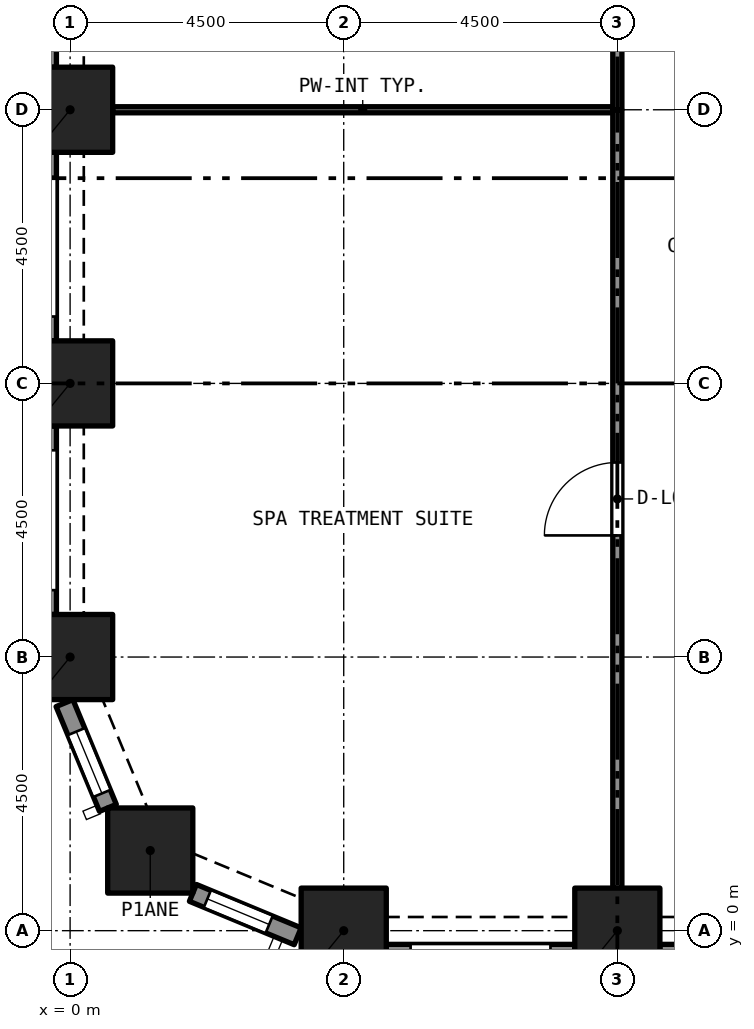
"""IFC4 building model, lengths in metres.
Left out: names, types, materials, properties, quantities, classifications, styles, units other than length and angle.
Written with IfcOpenShell. Run it as: python <this file> out.ifc"""

import sys

from ifc_helpers import new_model, si_unit, direction, frame, frame_2d, origin, origin_2d, place, context, subcontext, project, spatial, rectangle, extrude, element, fill, save


model = new_model("IFC4")
c1 = context("Model", 3, precision=1e-05, world=origin(), true_north=direction((0.0, 1.0)))
c2 = subcontext(c1, "Body", "Model", "MODEL_VIEW")
j1 = project(units=[si_unit("LENGTHUNIT", "METRE"), si_unit("PLANEANGLEUNIT", "RADIAN")], contexts=[c1])
p1 = place(None, origin())
s1 = spatial("IfcSite", under=j1, at=p1, CompositionType="ELEMENT")
p2 = place(p1, origin())
s2 = spatial("IfcBuilding", under=s1, at=p2, CompositionType="ELEMENT")
p3 = place(p2, frame((0.0, 0.0, 16.0)))
s3 = spatial("IfcBuildingStorey", under=s2, at=p3, CompositionType="ELEMENT", Elevation=16.0)
for number, where, z_axis, x_axis in (
    (1, (4.5, 0.0, 0.0), (0.0, 0.0, 1.0), (1.0, 0.0, 0.0)),
    (2, (9.0, 0.0, 0.0), (0.0, 0.0, 1.0), (1.0, 0.0, 0.0)),
    (3, (1.318, 1.318, 0.0), (0.0, 0.0, 1.0), (1.0, 0.0, 0.0)),
    (4, (0.0, 4.5, 0.0), (0.0, 0.0, 1.0), (1.0, 0.0, 0.0)),
    (5, (0.0, 9.0, 0.0), (0.0, 0.0, 1.0), (1.0, 0.0, 0.0)),
    (6, (0.0, 13.5, 0.0), (0.0, 0.0, 1.0), (1.0, 0.0, 0.0)),
):
    element("IfcColumn", number, at=place(p3, frame(where, z_axis=z_axis, x_axis=x_axis)), inside=s3, PredefinedType="COLUMN", context=c2, shape_type="SweptSolid", body=[
        extrude(rectangle(XDim=1.4, YDim=1.4, at=origin_2d()), origin(), (0.0, 0.0, 1.0), 5.0),
    ])
p4 = place(p3, frame((-0.375, 14.2, 0.0), z_axis=(0.0, 0.0, 1.0), x_axis=(0.0, 1.0, 0.0)))
e7 = element("IfcWall", 7, at=p4, inside=s3, PredefinedType="SOLIDWALL", context=c2, shape_type="SweptSolid", body=[
    extrude(rectangle(XDim=3.1, YDim=0.3, at=frame_2d((1.55, 0.0))), origin(), (0.0, 0.0, 1.0), 5.0),
])
p5 = place(p4, frame((0.4, 0.0, 0.45)))
e8 = element("IfcOpeningElement", 8, at=p5, cuts=e7, PredefinedType="OPENING", context=c2, shape_type="SweptSolid", body=[
    extrude(rectangle(XDim=2.3, YDim=3.3, at=frame_2d((1.15, 1.65))), frame((0.0, 0.16, 0.0), z_axis=(0.0, -1.0, 0.0), x_axis=(1.0, 0.0, 0.0)), (0.0, 0.0, 1.0), 0.32),
])
p6 = place(p3, frame((-0.375, 9.7, 0.0), z_axis=(0.0, 0.0, 1.0), x_axis=(0.0, 1.0, 0.0)))
e9 = element("IfcWall", 9, at=p6, inside=s3, PredefinedType="SOLIDWALL", context=c2, shape_type="SweptSolid", body=[
    extrude(rectangle(XDim=3.1, YDim=0.3, at=frame_2d((1.55, 0.0))), origin(), (0.0, 0.0, 1.0), 5.0),
])
p7 = place(p6, frame((0.4, 0.0, 0.45)))
e10 = element("IfcOpeningElement", 10, at=p7, cuts=e9, PredefinedType="OPENING", context=c2, shape_type="SweptSolid", body=[
    extrude(rectangle(XDim=2.3, YDim=3.3, at=frame_2d((1.15, 1.65))), frame((0.0, 0.16, 0.0), z_axis=(0.0, -1.0, 0.0), x_axis=(1.0, 0.0, 0.0)), (0.0, 0.0, 1.0), 0.32),
])
p8 = place(p3, frame((-0.375, 5.2, 0.0), z_axis=(0.0, 0.0, 1.0), x_axis=(0.0, 1.0, 0.0)))
e11 = element("IfcWall", 11, at=p8, inside=s3, PredefinedType="SOLIDWALL", context=c2, shape_type="SweptSolid", body=[
    extrude(rectangle(XDim=3.1, YDim=0.3, at=frame_2d((1.55, 0.0))), origin(), (0.0, 0.0, 1.0), 5.0),
])
p9 = place(p8, frame((0.4, 0.0, 0.45)))
e12 = element("IfcOpeningElement", 12, at=p9, cuts=e11, PredefinedType="OPENING", context=c2, shape_type="SweptSolid", body=[
    extrude(rectangle(XDim=2.3, YDim=3.3, at=frame_2d((1.15, 1.65))), frame((0.0, 0.16, 0.0), z_axis=(0.0, -1.0, 0.0), x_axis=(1.0, 0.0, 0.0)), (0.0, 0.0, 1.0), 0.32),
])
p10 = place(p3, frame((0.622, 2.02, 0.0), z_axis=(0.0, 0.0, 1.0), x_axis=(-0.38262540684, 0.923903565336, 0.0)))
e13 = element("IfcWall", 13, at=p10, inside=s3, PredefinedType="SOLIDWALL", context=c2, shape_type="SweptSolid", body=[
    extrude(rectangle(XDim=1.865, YDim=0.3, at=frame_2d((0.933, 0.0))), origin(), (0.0, 0.0, 1.0), 5.0),
])
p11 = place(p10, frame((0.258, 0.0, 0.45)))
e14 = element("IfcOpeningElement", 14, at=p11, cuts=e13, PredefinedType="OPENING", context=c2, shape_type="SweptSolid", body=[
    extrude(rectangle(XDim=1.1, YDim=3.3, at=frame_2d((0.55, 1.65))), frame((0.0, 0.16, 0.0), z_axis=(0.0, -1.0, 0.0), x_axis=(1.0, 0.0, 0.0)), (0.0, 0.0, 1.0), 0.32),
])
p12 = place(p3, frame((3.743, -0.092, 0.0), z_axis=(0.0, 0.0, 1.0), x_axis=(-0.923857286003, 0.382737135771, 0.0)))
e15 = element("IfcWall", 15, at=p12, inside=s3, PredefinedType="SOLIDWALL", context=c2, shape_type="SweptSolid", body=[
    extrude(rectangle(XDim=1.865, YDim=0.3, at=frame_2d((0.933, 0.0))), origin(), (0.0, 0.0, 1.0), 5.0),
])
p13 = place(p12, frame((0.508, 0.0, 0.45)))
e16 = element("IfcOpeningElement", 16, at=p13, cuts=e15, PredefinedType="OPENING", context=c2, shape_type="SweptSolid", body=[
    extrude(rectangle(XDim=1.1, YDim=3.3, at=frame_2d((0.55, 1.65))), frame((0.0, 0.16, 0.0), z_axis=(0.0, -1.0, 0.0), x_axis=(1.0, 0.0, 0.0)), (0.0, 0.0, 1.0), 0.32),
])
p14 = place(p3, frame((8.3, -0.375, 0.0), z_axis=(0.0, 0.0, 1.0), x_axis=(-1.0, 0.0, 0.0)))
e17 = element("IfcWall", 17, at=p14, inside=s3, PredefinedType="SOLIDWALL", context=c2, shape_type="SweptSolid", body=[
    extrude(rectangle(XDim=3.1, YDim=0.3, at=frame_2d((1.55, 0.0))), origin(), (0.0, 0.0, 1.0), 5.0),
])
p15 = place(p14, frame((0.4, 0.0, 0.45)))
e18 = element("IfcOpeningElement", 18, at=p15, cuts=e17, PredefinedType="OPENING", context=c2, shape_type="SweptSolid", body=[
    extrude(rectangle(XDim=2.3, YDim=3.3, at=frame_2d((1.15, 1.65))), frame((0.0, 0.16, 0.0), z_axis=(0.0, -1.0, 0.0), x_axis=(1.0, 0.0, 0.0)), (0.0, 0.0, 1.0), 0.32),
])
p16 = place(p3, frame((12.8, -0.375, 0.0), z_axis=(0.0, 0.0, 1.0), x_axis=(-1.0, 0.0, 0.0)))
e19 = element("IfcWall", 19, at=p16, inside=s3, PredefinedType="SOLIDWALL", context=c2, shape_type="SweptSolid", body=[
    extrude(rectangle(XDim=3.1, YDim=0.3, at=frame_2d((1.55, 0.0))), origin(), (0.0, 0.0, 1.0), 5.0),
])
p17 = place(p16, frame((0.4, 0.0, 0.45)))
e20 = element("IfcOpeningElement", 20, at=p17, cuts=e19, PredefinedType="OPENING", context=c2, shape_type="SweptSolid", body=[
    extrude(rectangle(XDim=2.3, YDim=3.3, at=frame_2d((1.15, 1.65))), frame((0.0, 0.16, 0.0), z_axis=(0.0, -1.0, 0.0), x_axis=(1.0, 0.0, 0.0)), (0.0, 0.0, 1.0), 0.32),
])
p18 = place(p3, frame((0.7, 13.5, 0.0), z_axis=(0.0, 0.0, 1.0), x_axis=(1.0, 0.0, 0.0)))
e21 = element("IfcWall", 21, at=p18, inside=s3, PredefinedType="PARTITIONING", context=c2, shape_type="SweptSolid", body=[
    extrude(rectangle(XDim=8.225, YDim=0.1, at=frame_2d((4.113, 0.0))), origin(), (0.0, 0.0, 1.0), 4.65),
])
p19 = place(p3, frame((9.0, 0.7, 0.0), z_axis=(0.0, 0.0, 1.0), x_axis=(0.0, 1.0, 0.0)))
e22 = element("IfcWall", 22, at=p19, inside=s3, PredefinedType="PARTITIONING", context=c2, shape_type="SweptSolid", body=[
    extrude(rectangle(XDim=12.8, YDim=0.15, at=frame_2d((6.4, 0.0))), origin(), (0.0, 0.0, 1.0), 4.65),
])
p20 = place(p19, frame((5.8, 0.0, 0.0)))
e23 = element("IfcOpeningElement", 23, at=p20, cuts=e22, PredefinedType="OPENING", context=c2, shape_type="SweptSolid", body=[
    extrude(rectangle(XDim=1.2, YDim=2.1, at=frame_2d((0.6, 1.05))), frame((0.0, 0.085, 0.0), z_axis=(0.0, -1.0, 0.0), x_axis=(1.0, 0.0, 0.0)), (0.0, 0.0, 1.0), 0.17),
])
p21 = place(p3, frame((9.0, 13.5, 0.0), z_axis=(0.0, 0.0, 1.0), x_axis=(0.0, 1.0, 0.0)))
e24 = element("IfcWall", 24, at=p21, inside=s3, PredefinedType="PARTITIONING", context=c2, shape_type="SweptSolid", body=[
    extrude(rectangle(XDim=8.3, YDim=0.15, at=frame_2d((4.15, 0.0))), origin(), (0.0, 0.0, 1.0), 4.65),
])
p22 = place(p21, frame((3.55, 0.0, 0.0)))
e25 = element("IfcOpeningElement", 25, at=p22, cuts=e24, PredefinedType="OPENING", context=c2, shape_type="SweptSolid", body=[
    extrude(rectangle(XDim=1.2, YDim=2.1, at=frame_2d((0.6, 1.05))), frame((0.0, 0.085, 0.0), z_axis=(0.0, -1.0, 0.0), x_axis=(1.0, 0.0, 0.0)), (0.0, 0.0, 1.0), 0.17),
])
p23 = place(p11, origin())
e26 = element("IfcWindow", 26, at=p23, inside=s3, PartitioningType="SINGLE_PANEL", PredefinedType="WINDOW", context=c2, shape_type="SweptSolid", body=[
    extrude(rectangle(XDim=1.1, YDim=3.3, at=frame_2d((0.55, 1.65))), frame((0.0, 0.03, 0.0), z_axis=(0.0, -1.0, 0.0), x_axis=(1.0, 0.0, 0.0)), (0.0, 0.0, 1.0), 0.06),
])
fill(e14, e26)
p24 = place(p13, origin())
e27 = element("IfcWindow", 27, at=p24, inside=s3, PartitioningType="SINGLE_PANEL", PredefinedType="WINDOW", context=c2, shape_type="SweptSolid", body=[
    extrude(rectangle(XDim=1.1, YDim=3.3, at=frame_2d((0.55, 1.65))), frame((0.0, 0.03, 0.0), z_axis=(0.0, -1.0, 0.0), x_axis=(1.0, 0.0, 0.0)), (0.0, 0.0, 1.0), 0.06),
])
fill(e16, e27)
p25 = place(p20, origin())
e28 = element("IfcDoor", 28, at=p25, inside=s3, OperationType="SINGLE_SWING_RIGHT", PredefinedType="DOOR", context=c2, shape_type="SweptSolid", body=[
    extrude(rectangle(XDim=1.2, YDim=2.1, at=frame_2d((0.6, 1.05))), frame((0.0, 0.025, 0.0), z_axis=(0.0, -1.0, 0.0), x_axis=(1.0, 0.0, 0.0)), (0.0, 0.0, 1.0), 0.05),
])
fill(e23, e28)
save(model, sys.argv[1])
